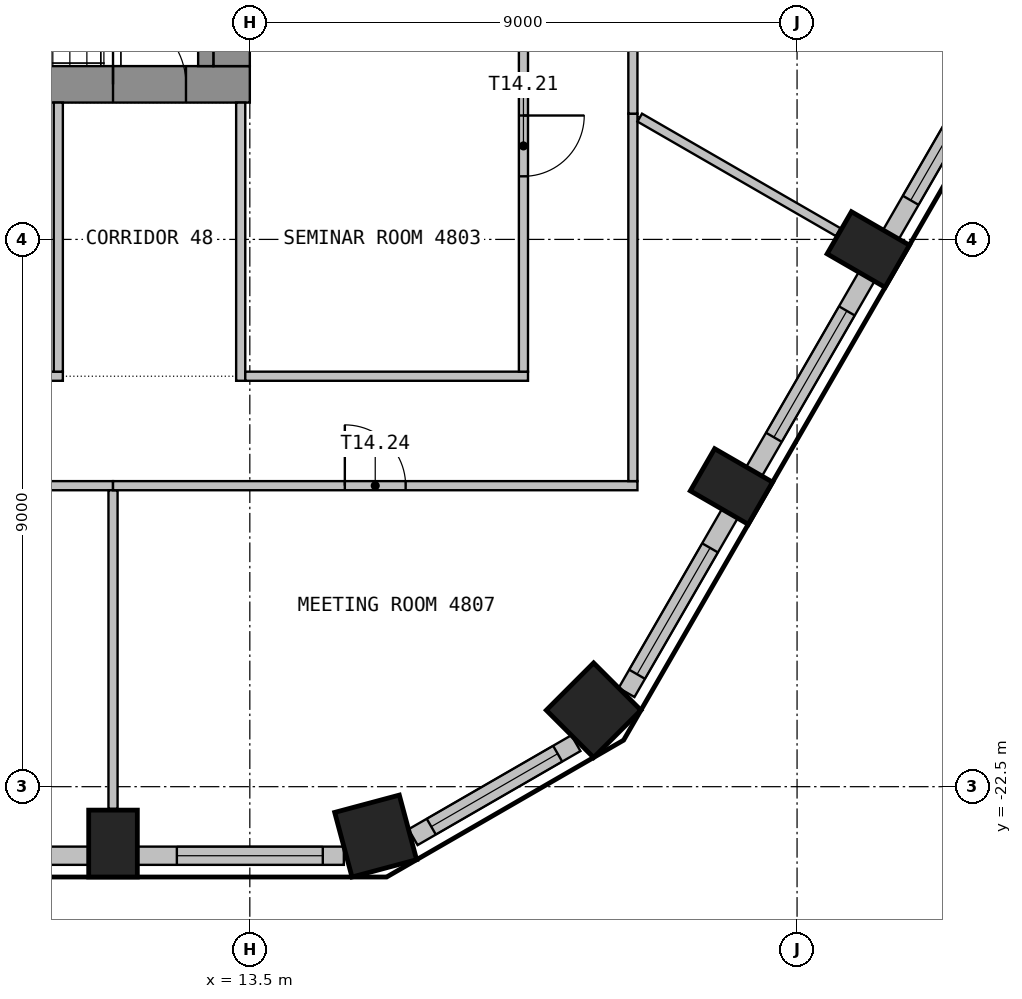
"""IFC4 building model, lengths in metres.
Left out: names, types, materials, properties, quantities, classifications, styles, units other than length and angle.
Written with IfcOpenShell. Run it as: python <this file> out.ifc"""

import sys

from ifc_helpers import new_model, si_unit, direction, frame, frame_2d, origin, origin_2d, place, context, subcontext, project, spatial, rectangle, extrude, element, fill, save


model = new_model("IFC4")
c1 = context("Model", 3, precision=1e-05, world=origin(), true_north=direction((0.0, 1.0)))
c2 = subcontext(c1, "Body", "Model", "MODEL_VIEW")
j1 = project(units=[si_unit("LENGTHUNIT", "METRE"), si_unit("PLANEANGLEUNIT", "RADIAN")], contexts=[c1])
p1 = place(None, origin())
s1 = spatial("IfcSite", under=j1, at=p1, CompositionType="ELEMENT")
p2 = place(p1, origin())
s2 = spatial("IfcBuilding", under=s1, at=p2, CompositionType="ELEMENT")
p3 = place(p2, frame((0.0, 0.0, 195.6)))
s3 = spatial("IfcBuildingStorey", under=s2, at=p3, CompositionType="ELEMENT", Elevation=195.6)
p4 = place(p3, frame((11.25, -23.436, 0.0), z_axis=(0.0, 0.0, 1.0), x_axis=(1.0, 0.0, 0.0)))
e1 = element("IfcColumn", 1, at=p4, inside=s3, PredefinedType="COLUMN", context=c2, shape_type="SweptSolid", body=[
    extrude(rectangle(XDim=0.8, YDim=1.1, at=origin_2d()), origin(), (0.0, 0.0, 1.0), 3.55),
])
for number, where, z_axis, x_axis in (
    (2, (15.57, -23.312, 0.0), (0.0, 0.0, 1.0), (0.966, 0.259, 0.0)),
    (3, (19.154, -21.242, 0.0), (0.0, 0.0, 1.0), (0.707, 0.707, 0.0)),
):
    element("IfcColumn", number, at=place(p3, frame(where, z_axis=z_axis, x_axis=x_axis)), inside=s3, PredefinedType="COLUMN", context=c2, shape_type="SweptSolid", body=[
        extrude(rectangle(XDim=1.1, YDim=1.1, at=origin_2d()), origin(), (0.0, 0.0, 1.0), 3.55),
    ])
for number, where, z_axis, x_axis in (
    (4, (21.421, -17.563, 0.0), (0.0, 0.0, 1.0), (0.5, 0.866, 0.0)),
    (5, (23.671, -13.666, 0.0), (0.0, 0.0, 1.0), (0.5, 0.866, 0.0)),
):
    element("IfcColumn", number, at=place(p3, frame(where, z_axis=z_axis, x_axis=x_axis)), inside=s3, PredefinedType="COLUMN", context=c2, shape_type="SweptSolid", body=[
        extrude(rectangle(XDim=0.8, YDim=1.1, at=origin_2d()), origin(), (0.0, 0.0, 1.0), 3.55),
    ])
p5 = place(p3, frame((7.15, -23.635, 0.0), z_axis=(0.0, 0.0, 1.0), x_axis=(1.0, 0.0, 0.0)))
e6 = element("IfcWall", 6, at=p5, inside=s3, PredefinedType="SOLIDWALL", context=c2, shape_type="SweptSolid", body=[
    extrude(rectangle(XDim=3.699, YDim=0.3, at=frame_2d((1.85, 0.0))), origin(), (0.0, 0.0, 1.0), 3.55),
])
p6 = place(p5, frame((0.649, 0.0, 0.9)))
e7 = element("IfcOpeningElement", 7, at=p6, cuts=e6, PredefinedType="OPENING", context=c2, shape_type="SweptSolid", body=[
    extrude(rectangle(XDim=2.4, YDim=2.1, at=frame_2d((1.2, 1.05))), frame((0.0, 0.16, 0.0), z_axis=(0.0, -1.0, 0.0), x_axis=(1.0, 0.0, 0.0)), (0.0, 0.0, 1.0), 0.32),
])
p7 = place(p3, frame((11.65, -23.635, 0.0), z_axis=(0.0, 0.0, 1.0), x_axis=(1.0, 0.0, 0.0)))
e8 = element("IfcWall", 8, at=p7, inside=s3, PredefinedType="SOLIDWALL", context=c2, shape_type="SweptSolid", body=[
    extrude(rectangle(XDim=3.396, YDim=0.3, at=frame_2d((1.698, 0.0))), origin(), (0.0, 0.0, 1.0), 3.55),
])
p8 = place(p7, frame((0.649, 0.0, 0.9)))
e9 = element("IfcOpeningElement", 9, at=p8, cuts=e8, PredefinedType="OPENING", context=c2, shape_type="SweptSolid", body=[
    extrude(rectangle(XDim=2.4, YDim=2.1, at=frame_2d((1.2, 1.05))), frame((0.0, 0.16, 0.0), z_axis=(0.0, -1.0, 0.0), x_axis=(1.0, 0.0, 0.0)), (0.0, 0.0, 1.0), 0.32),
])
p9 = place(p3, frame((16.184, -23.331, 0.0), z_axis=(0.0, 0.0, 1.0), x_axis=(0.865994975416, 0.500052699777, 0.0)))
e10 = element("IfcWall", 10, at=p9, inside=s3, PredefinedType="SOLIDWALL", context=c2, shape_type="SweptSolid", body=[
    extrude(rectangle(XDim=3.093, YDim=0.3, at=frame_2d((1.546, 0.0))), origin(), (0.0, 0.0, 1.0), 3.55),
])
p10 = place(p9, frame((0.346, 0.0, 0.9)))
e11 = element("IfcOpeningElement", 11, at=p10, cuts=e10, PredefinedType="OPENING", context=c2, shape_type="SweptSolid", body=[
    extrude(rectangle(XDim=2.4, YDim=2.1, at=frame_2d((1.2, 1.05))), frame((0.0, 0.16, 0.0), z_axis=(0.0, -1.0, 0.0), x_axis=(1.0, 0.0, 0.0)), (0.0, 0.0, 1.0), 0.32),
])
p11 = place(p3, frame((19.696, -20.951, 0.0), z_axis=(0.0, 0.0, 1.0), x_axis=(0.500012868213, 0.866017974191, 0.0)))
e12 = element("IfcWall", 12, at=p11, inside=s3, PredefinedType="SOLIDWALL", context=c2, shape_type="SweptSolid", body=[
    extrude(rectangle(XDim=3.396, YDim=0.3, at=frame_2d((1.698, 0.0))), origin(), (0.0, 0.0, 1.0), 3.55),
])
p12 = place(p11, frame((0.346, 0.0, 0.9)))
e13 = element("IfcOpeningElement", 13, at=p12, cuts=e12, PredefinedType="OPENING", context=c2, shape_type="SweptSolid", body=[
    extrude(rectangle(XDim=2.4, YDim=2.1, at=frame_2d((1.2, 1.05))), frame((0.0, 0.16, 0.0), z_axis=(0.0, -1.0, 0.0), x_axis=(1.0, 0.0, 0.0)), (0.0, 0.0, 1.0), 0.32),
])
p13 = place(p3, frame((21.794, -17.317, 0.0), z_axis=(0.0, 0.0, 1.0), x_axis=(0.500029062817, 0.866008623709, 0.0)))
e14 = element("IfcWall", 14, at=p13, inside=s3, PredefinedType="SOLIDWALL", context=c2, shape_type="SweptSolid", body=[
    extrude(rectangle(XDim=3.699, YDim=0.3, at=frame_2d((1.85, 0.0))), origin(), (0.0, 0.0, 1.0), 3.55),
])
p14 = place(p13, frame((0.649, 0.0, 0.9)))
e15 = element("IfcOpeningElement", 15, at=p14, cuts=e14, PredefinedType="OPENING", context=c2, shape_type="SweptSolid", body=[
    extrude(rectangle(XDim=2.4, YDim=2.1, at=frame_2d((1.2, 1.05))), frame((0.0, 0.16, 0.0), z_axis=(0.0, -1.0, 0.0), x_axis=(1.0, 0.0, 0.0)), (0.0, 0.0, 1.0), 0.32),
])
p15 = place(p3, frame((24.044, -13.419, 0.0), z_axis=(0.0, 0.0, 1.0), x_axis=(0.500029062817, 0.866008623709, 0.0)))
e16 = element("IfcWall", 16, at=p15, inside=s3, PredefinedType="SOLIDWALL", context=c2, shape_type="SweptSolid", body=[
    extrude(rectangle(XDim=3.699, YDim=0.3, at=frame_2d((1.85, 0.0))), origin(), (0.0, 0.0, 1.0), 3.55),
])
p16 = place(p15, frame((0.649, 0.0, 0.9)))
e17 = element("IfcOpeningElement", 17, at=p16, cuts=e16, PredefinedType="OPENING", context=c2, shape_type="SweptSolid", body=[
    extrude(rectangle(XDim=2.4, YDim=2.1, at=frame_2d((1.2, 1.05))), frame((0.0, 0.16, 0.0), z_axis=(0.0, -1.0, 0.0), x_axis=(1.0, 0.0, 0.0)), (0.0, 0.0, 1.0), 0.32),
])
p17 = place(p3, frame((-13.5, -10.95, 0.0), z_axis=(0.0, 0.0, 1.0), x_axis=(1.0, 0.0, 0.0)))
e18 = element("IfcWall", 18, at=p17, inside=s3, PredefinedType="SHEAR", context=c2, shape_type="SweptSolid", body=[
    extrude(rectangle(XDim=27.0, YDim=0.6, at=frame_2d((13.5, 0.0))), origin(), (0.0, 0.0, 1.0), 3.55),
])
p18 = place(p17, frame((12.3, 0.0, 0.0)))
e19 = element("IfcOpeningElement", 19, at=p18, cuts=e18, PredefinedType="OPENING", context=c2, shape_type="SweptSolid", body=[
    extrude(rectangle(XDim=2.4, YDim=2.1, at=frame_2d((1.2, 1.05))), frame((0.0, 0.31, 0.0), z_axis=(0.0, -1.0, 0.0), x_axis=(1.0, 0.0, 0.0)), (0.0, 0.0, 1.0), 0.62),
])
p19 = place(p17, frame((1.05, 0.0, 0.0)))
e20 = element("IfcOpeningElement", 20, at=p19, cuts=e18, PredefinedType="OPENING", context=c2, shape_type="SweptSolid", body=[
    extrude(rectangle(XDim=1.2, YDim=2.1, at=frame_2d((0.6, 1.05))), frame((0.0, 0.31, 0.0), z_axis=(0.0, -1.0, 0.0), x_axis=(1.0, 0.0, 0.0)), (0.0, 0.0, 1.0), 0.62),
])
p20 = place(p17, frame((24.75, 0.0, 0.0)))
e21 = element("IfcOpeningElement", 21, at=p20, cuts=e18, PredefinedType="OPENING", context=c2, shape_type="SweptSolid", body=[
    extrude(rectangle(XDim=1.2, YDim=2.1, at=frame_2d((0.6, 1.05))), frame((0.0, 0.31, 0.0), z_axis=(0.0, -1.0, 0.0), x_axis=(1.0, 0.0, 0.0)), (0.0, 0.0, 1.0), 0.62),
])
p21 = place(p3, frame((13.2, -10.65, 0.0), z_axis=(0.0, 0.0, 1.0), x_axis=(0.0, 1.0, 0.0)))
e22 = element("IfcWall", 22, at=p21, inside=s3, PredefinedType="SHEAR", context=c2, shape_type="SweptSolid", body=[
    extrude(rectangle(XDim=21.3, YDim=0.6, at=frame_2d((10.65, 0.0))), origin(), (0.0, 0.0, 1.0), 3.55),
])
p22 = place(p21, frame((9.45, 0.0, 0.0)))
e23 = element("IfcOpeningElement", 23, at=p22, cuts=e22, PredefinedType="OPENING", context=c2, shape_type="SweptSolid", body=[
    extrude(rectangle(XDim=2.4, YDim=2.1, at=frame_2d((1.2, 1.05))), frame((0.0, 0.31, 0.0), z_axis=(0.0, -1.0, 0.0), x_axis=(1.0, 0.0, 0.0)), (0.0, 0.0, 1.0), 0.62),
])
p23 = place(p3, frame((12.775, -10.65, 0.0), z_axis=(0.0, 0.0, 1.0), x_axis=(0.0, 1.0, 0.0)))
e24 = element("IfcWall", 24, at=p23, inside=s3, PredefinedType="SHEAR", context=c2, shape_type="SweptSolid", body=[
    extrude(rectangle(XDim=3.25, YDim=0.25, at=frame_2d((1.625, 0.0))), origin(), (0.0, 0.0, 1.0), 3.55),
])
p24 = place(p3, frame((10.425, -15.75, 0.0), z_axis=(0.0, 0.0, 1.0), x_axis=(-1.0, 0.0, 0.0)))
e25 = element("IfcWall", 25, at=p24, inside=s3, PredefinedType="PARTITIONING", context=c2, shape_type="SweptSolid", body=[
    extrude(rectangle(XDim=8.85, YDim=0.15, at=frame_2d((4.425, 0.0))), origin(), (0.0, 0.0, 1.0), 3.55),
])
p25 = place(p24, frame((3.925, 0.0, 0.0)))
e26 = element("IfcOpeningElement", 26, at=p25, cuts=e25, PredefinedType="OPENING", context=c2, shape_type="SweptSolid", body=[
    extrude(rectangle(XDim=1.0, YDim=2.1, at=frame_2d((0.5, 1.05))), frame((0.0, 0.085, 0.0), z_axis=(0.0, -1.0, 0.0), x_axis=(1.0, 0.0, 0.0)), (0.0, 0.0, 1.0), 0.17),
])
p26 = place(p3, frame((2.25, -17.55, 0.0), z_axis=(0.0, 0.0, 1.0), x_axis=(1.0, 0.0, 0.0)))
e27 = element("IfcWall", 27, at=p26, inside=s3, PredefinedType="PARTITIONING", context=c2, shape_type="SweptSolid", body=[
    extrude(rectangle(XDim=9.0, YDim=0.15, at=frame_2d((4.5, 0.0))), origin(), (0.0, 0.0, 1.0), 3.55),
])
p27 = place(p26, frame((4.0, 0.0, 0.0)))
e28 = element("IfcOpeningElement", 28, at=p27, cuts=e27, PredefinedType="OPENING", context=c2, shape_type="SweptSolid", body=[
    extrude(rectangle(XDim=1.0, YDim=2.1, at=frame_2d((0.5, 1.05))), frame((0.0, 0.085, 0.0), z_axis=(0.0, -1.0, 0.0), x_axis=(1.0, 0.0, 0.0)), (0.0, 0.0, 1.0), 0.17),
])
p28 = place(p3, frame((10.35, -11.25, 0.0), z_axis=(0.0, 0.0, 1.0), x_axis=(0.0, -1.0, 0.0)))
e29 = element("IfcWall", 29, at=p28, inside=s3, PredefinedType="PARTITIONING", context=c2, shape_type="SweptSolid", body=[
    extrude(rectangle(XDim=4.425, YDim=0.15, at=frame_2d((2.212, 0.0))), origin(), (0.0, 0.0, 1.0), 3.55),
])
p29 = place(p3, frame((11.25, -17.625, 0.0), z_axis=(0.0, 0.0, 1.0), x_axis=(0.0, -1.0, 0.0)))
e30 = element("IfcWall", 30, at=p29, inside=s3, PredefinedType="PARTITIONING", context=c2, shape_type="SweptSolid", body=[
    extrude(rectangle(XDim=5.24, YDim=0.15, at=frame_2d((2.62, 0.0))), origin(), (0.0, 0.0, 1.0), 3.55),
])
p30 = place(p3, frame((11.25, -17.55, 0.0), z_axis=(0.0, 0.0, 1.0), x_axis=(1.0, 0.0, 0.0)))
e31 = element("IfcWall", 31, at=p30, inside=s3, PredefinedType="PARTITIONING", context=c2, shape_type="SweptSolid", body=[
    extrude(rectangle(XDim=8.625, YDim=0.15, at=frame_2d((4.312, 0.0))), origin(), (0.0, 0.0, 1.0), 3.55),
])
p31 = place(p30, frame((3.812, 0.0, 0.0)))
e32 = element("IfcOpeningElement", 32, at=p31, cuts=e31, PredefinedType="OPENING", context=c2, shape_type="SweptSolid", body=[
    extrude(rectangle(XDim=1.0, YDim=2.1, at=frame_2d((0.5, 1.05))), frame((0.0, 0.085, 0.0), z_axis=(0.0, -1.0, 0.0), x_axis=(1.0, 0.0, 0.0)), (0.0, 0.0, 1.0), 0.17),
])
p32 = place(p3, frame((13.35, -15.825, 0.0), z_axis=(0.0, 0.0, 1.0), x_axis=(0.0, 1.0, 0.0)))
e33 = element("IfcWall", 33, at=p32, inside=s3, PredefinedType="PARTITIONING", context=c2, shape_type="SweptSolid", body=[
    extrude(rectangle(XDim=4.575, YDim=0.15, at=frame_2d((2.288, 0.0))), origin(), (0.0, 0.0, 1.0), 3.55),
])
p33 = place(p3, frame((18.075, -15.75, 0.0), z_axis=(0.0, 0.0, 1.0), x_axis=(-1.0, 0.0, 0.0)))
e34 = element("IfcWall", 34, at=p33, inside=s3, PredefinedType="PARTITIONING", context=c2, shape_type="SweptSolid", body=[
    extrude(rectangle(XDim=4.65, YDim=0.15, at=frame_2d((2.325, 0.0))), origin(), (0.0, 0.0, 1.0), 3.55),
])
p34 = place(p3, frame((18.0, -8.25, 0.0), z_axis=(0.0, 0.0, 1.0), x_axis=(0.0, -1.0, 0.0)))
e35 = element("IfcWall", 35, at=p34, inside=s3, PredefinedType="PARTITIONING", context=c2, shape_type="SweptSolid", body=[
    extrude(rectangle(XDim=7.425, YDim=0.15, at=frame_2d((3.712, 0.0))), origin(), (0.0, 0.0, 1.0), 3.55),
])
p35 = place(p34, frame((3.212, 0.0, 0.0)))
e36 = element("IfcOpeningElement", 36, at=p35, cuts=e35, PredefinedType="OPENING", context=c2, shape_type="SweptSolid", body=[
    extrude(rectangle(XDim=1.0, YDim=2.1, at=frame_2d((0.5, 1.05))), frame((0.0, 0.085, 0.0), z_axis=(0.0, -1.0, 0.0), x_axis=(1.0, 0.0, 0.0)), (0.0, 0.0, 1.0), 0.17),
])
p36 = place(p3, frame((19.8, -17.475, 0.0), z_axis=(0.0, 0.0, 1.0), x_axis=(0.0, 1.0, 0.0)))
e37 = element("IfcWall", 37, at=p36, inside=s3, PredefinedType="PARTITIONING", context=c2, shape_type="SweptSolid", body=[
    extrude(rectangle(XDim=6.043, YDim=0.15, at=frame_2d((3.021, 0.0))), origin(), (0.0, 0.0, 1.0), 3.55),
])
p37 = place(p3, frame((19.8, -11.432, 0.0), z_axis=(0.0, 0.0, 1.0), x_axis=(0.0, 1.0, 0.0)))
e38 = element("IfcWall", 38, at=p37, inside=s3, PredefinedType="PARTITIONING", context=c2, shape_type="SweptSolid", body=[
    extrude(rectangle(XDim=10.393, YDim=0.15, at=frame_2d((5.196, 0.0))), origin(), (0.0, 0.0, 1.0), 3.55),
])
p38 = place(p37, frame((4.697, 0.0, 0.0)))
e39 = element("IfcOpeningElement", 39, at=p38, cuts=e38, PredefinedType="OPENING", context=c2, shape_type="SweptSolid", body=[
    extrude(rectangle(XDim=1.0, YDim=2.1, at=frame_2d((0.5, 1.05))), frame((0.0, 0.085, 0.0), z_axis=(0.0, -1.0, 0.0), x_axis=(1.0, 0.0, 0.0)), (0.0, 0.0, 1.0), 0.17),
])
p39 = place(p3, frame((19.913, -11.497, 0.0), z_axis=(0.0, 0.0, 1.0), x_axis=(0.866090681374, -0.499886918849, 0.0)))
e40 = element("IfcWall", 40, at=p39, inside=s3, PredefinedType="PARTITIONING", context=c2, shape_type="SweptSolid", body=[
    extrude(rectangle(XDim=3.769, YDim=0.15, at=frame_2d((1.885, 0.0))), origin(), (0.0, 0.0, 1.0), 3.55),
])
p40 = place(p8, origin())
e41 = element("IfcWindow", 41, at=p40, inside=s3, PartitioningType="SINGLE_PANEL", PredefinedType="WINDOW", context=c2, shape_type="SweptSolid", body=[
    extrude(rectangle(XDim=2.4, YDim=2.1, at=frame_2d((1.2, 1.05))), frame((0.0, 0.03, 0.0), z_axis=(0.0, -1.0, 0.0), x_axis=(1.0, 0.0, 0.0)), (0.0, 0.0, 1.0), 0.06),
])
fill(e9, e41)
p41 = place(p10, origin())
e42 = element("IfcWindow", 42, at=p41, inside=s3, PartitioningType="SINGLE_PANEL", PredefinedType="WINDOW", context=c2, shape_type="SweptSolid", body=[
    extrude(rectangle(XDim=2.4, YDim=2.1, at=frame_2d((1.2, 1.05))), frame((0.0, 0.03, 0.0), z_axis=(0.0, -1.0, 0.0), x_axis=(1.0, 0.0, 0.0)), (0.0, 0.0, 1.0), 0.06),
])
fill(e11, e42)
p42 = place(p12, origin())
e43 = element("IfcWindow", 43, at=p42, inside=s3, PartitioningType="SINGLE_PANEL", PredefinedType="WINDOW", context=c2, shape_type="SweptSolid", body=[
    extrude(rectangle(XDim=2.4, YDim=2.1, at=frame_2d((1.2, 1.05))), frame((0.0, 0.03, 0.0), z_axis=(0.0, -1.0, 0.0), x_axis=(1.0, 0.0, 0.0)), (0.0, 0.0, 1.0), 0.06),
])
fill(e13, e43)
p43 = place(p14, origin())
e44 = element("IfcWindow", 44, at=p43, inside=s3, PartitioningType="SINGLE_PANEL", PredefinedType="WINDOW", context=c2, shape_type="SweptSolid", body=[
    extrude(rectangle(XDim=2.4, YDim=2.1, at=frame_2d((1.2, 1.05))), frame((0.0, 0.03, 0.0), z_axis=(0.0, -1.0, 0.0), x_axis=(1.0, 0.0, 0.0)), (0.0, 0.0, 1.0), 0.06),
])
fill(e15, e44)
p44 = place(p16, origin())
e45 = element("IfcWindow", 45, at=p44, inside=s3, PartitioningType="SINGLE_PANEL", PredefinedType="WINDOW", context=c2, shape_type="SweptSolid", body=[
    extrude(rectangle(XDim=2.4, YDim=2.1, at=frame_2d((1.2, 1.05))), frame((0.0, 0.03, 0.0), z_axis=(0.0, -1.0, 0.0), x_axis=(1.0, 0.0, 0.0)), (0.0, 0.0, 1.0), 0.06),
])
fill(e17, e45)
p45 = place(p20, origin())
e46 = element("IfcDoor", 46, at=p45, inside=s3, OperationType="SINGLE_SWING_RIGHT", PredefinedType="DOOR", context=c2, shape_type="SweptSolid", body=[
    extrude(rectangle(XDim=1.2, YDim=2.1, at=frame_2d((0.6, 1.05))), frame((0.0, 0.025, 0.0), z_axis=(0.0, -1.0, 0.0), x_axis=(1.0, 0.0, 0.0)), (0.0, 0.0, 1.0), 0.05),
])
fill(e21, e46)
p46 = place(p35, origin())
e47 = element("IfcDoor", 47, at=p46, inside=s3, OperationType="SINGLE_SWING_RIGHT", PredefinedType="DOOR", context=c2, shape_type="SweptSolid", body=[
    extrude(rectangle(XDim=1.0, YDim=2.1, at=frame_2d((0.5, 1.05))), frame((0.0, 0.025, 0.0), z_axis=(0.0, -1.0, 0.0), x_axis=(1.0, 0.0, 0.0)), (0.0, 0.0, 1.0), 0.05),
])
fill(e36, e47)
p47 = place(p31, origin())
e48 = element("IfcDoor", 48, at=p47, inside=s3, OperationType="SINGLE_SWING_RIGHT", PredefinedType="DOOR", context=c2, shape_type="SweptSolid", body=[
    extrude(rectangle(XDim=1.0, YDim=2.1, at=frame_2d((0.5, 1.05))), frame((0.0, 0.025, 0.0), z_axis=(0.0, -1.0, 0.0), x_axis=(1.0, 0.0, 0.0)), (0.0, 0.0, 1.0), 0.05),
])
fill(e32, e48)
save(model, sys.argv[1])
